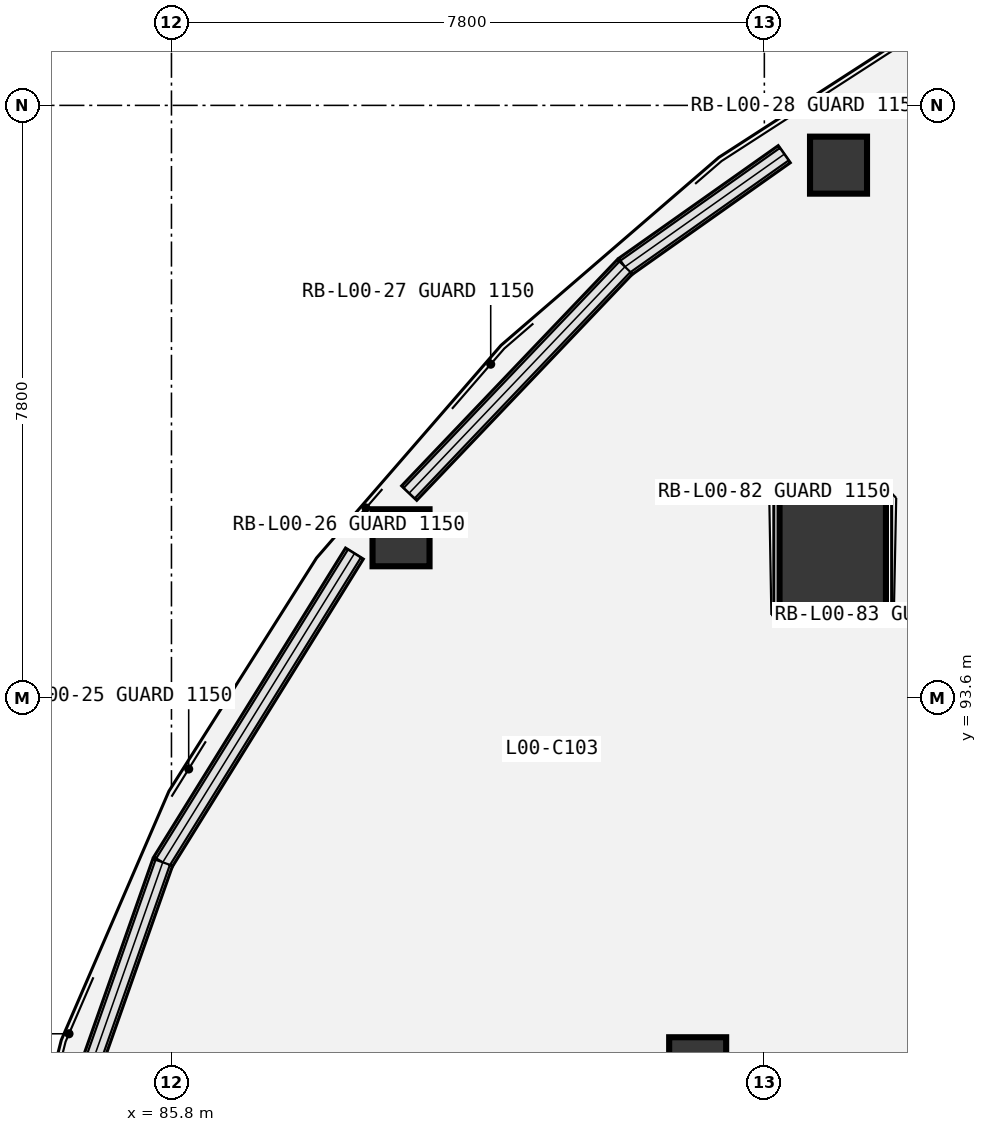
"""IFC4 building model, lengths in metres.
Left out: names, types, materials, properties, quantities, classifications, styles, units other than length and angle.
Written with IfcOpenShell. Run it as: python <this file> out.ifc"""

import sys

from ifc_helpers import new_model, si_unit, direction, frame, frame_2d, origin, origin_2d, place, context, subcontext, project, spatial, rectangle, extrude, element, save


model = new_model("IFC4")
c1 = context("Model", 3, precision=1e-05, world=origin(), true_north=direction((0.0, 1.0)))
c2 = subcontext(c1, "Body", "Model", "MODEL_VIEW")
j1 = project(units=[si_unit("LENGTHUNIT", "METRE"), si_unit("PLANEANGLEUNIT", "RADIAN")], contexts=[c1])
p1 = place(None, origin())
s1 = spatial("IfcSite", under=j1, at=p1, CompositionType="ELEMENT")
p2 = place(p1, origin())
s2 = spatial("IfcBuilding", under=s1, at=p2, CompositionType="ELEMENT")
p3 = place(p2, origin())
s3 = spatial("IfcBuildingStorey", under=s2, at=p3, CompositionType="ELEMENT", Elevation=0.0)
p4 = place(p3, frame((94.5, 95.5, 0.0), z_axis=(0.0, 0.0, 1.0), x_axis=(1.0, 0.0, 0.0)))
e1 = element("IfcColumn", 1, at=p4, inside=s3, PredefinedType="COLUMN", context=c2, shape_type="SweptSolid", body=[
    extrude(rectangle(XDim=1.4, YDim=1.4, at=origin_2d()), origin(), (0.0, 0.0, 1.0), 5.4),
])
for number, where, z_axis, x_axis in (
    (2, (94.576, 100.614, 0.0), (0.0, 0.0, 1.0), (1.0, 0.0, 0.0)),
    (3, (88.82, 95.711, 0.0), (0.0, 0.0, 1.0), (1.0, 0.0, 0.0)),
    (4, (92.723, 88.765, 0.0), (0.0, 0.0, 1.0), (1.0, 0.0, 0.0)),
):
    element("IfcColumn", number, at=place(p3, frame(where, z_axis=z_axis, x_axis=x_axis)), inside=s3, PredefinedType="COLUMN", context=c2, shape_type="SweptSolid", body=[
        extrude(rectangle(XDim=0.75, YDim=0.75, at=origin_2d()), origin(), (0.0, 0.0, 1.0), 5.4),
    ])
p5 = place(p3, frame((93.862, 100.758, 0.0), z_axis=(0.0, 0.0, 1.0), x_axis=(-0.816685705742, -0.57708271334, 0.0)))
e5 = element("IfcWall", 5, at=p5, inside=s3, PredefinedType="SOLIDWALL", context=c2, shape_type="SweptSolid", body=[
    extrude(rectangle(XDim=2.567, YDim=0.275, at=frame_2d((1.283, 0.0))), origin(), (0.0, 0.0, 1.0), 1.02),
])
p6 = place(p3, frame((91.766, 99.277, 0.0), z_axis=(0.0, 0.0, 1.0), x_axis=(-0.689956013093, -0.723851296882, 0.0)))
e6 = element("IfcWall", 6, at=p6, inside=s3, PredefinedType="SOLIDWALL", context=c2, shape_type="SweptSolid", body=[
    extrude(rectangle(XDim=4.113, YDim=0.275, at=frame_2d((2.056, 0.0))), origin(), (0.0, 0.0, 1.0), 1.02),
])
p7 = place(p3, frame((88.207, 95.504, 0.0), z_axis=(0.0, 0.0, 1.0), x_axis=(-0.527458195814, -0.849580985939, 0.0)))
e7 = element("IfcWall", 7, at=p7, inside=s3, PredefinedType="SOLIDWALL", context=c2, shape_type="SweptSolid", body=[
    extrude(rectangle(XDim=4.781, YDim=0.275, at=frame_2d((2.391, 0.0))), origin(), (0.0, 0.0, 1.0), 1.02),
])
p8 = place(p3, frame((85.685, 91.442, 0.0), z_axis=(0.0, 0.0, 1.0), x_axis=(-0.332298985331, -0.943174100762, 0.0)))
e8 = element("IfcWall", 8, at=p8, inside=s3, PredefinedType="SOLIDWALL", context=c2, shape_type="SweptSolid", body=[
    extrude(rectangle(XDim=4.803, YDim=0.275, at=frame_2d((2.402, 0.0))), origin(), (0.0, 0.0, 1.0), 1.02),
])
save(model, sys.argv[1])
